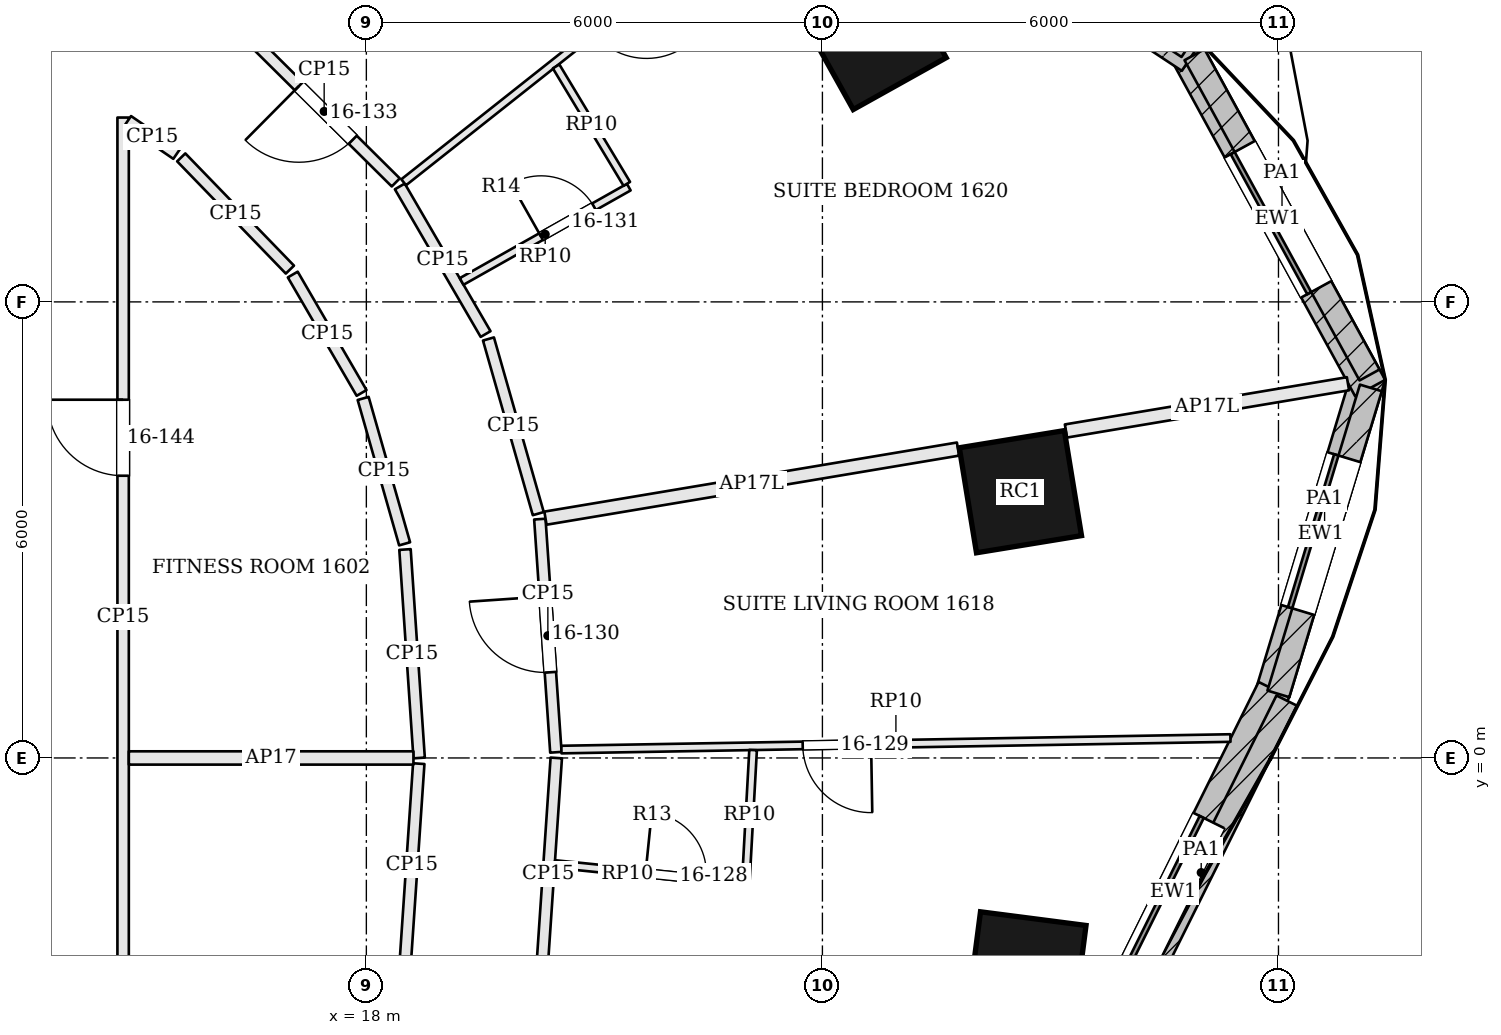
"""IFC4 building model, lengths in metres.
Left out: names, types, materials, properties, quantities, classifications, styles, units other than length and angle.
Written with IfcOpenShell. Run it as: python <this file> out.ifc"""

import sys

from ifc_helpers import new_model, si_unit, direction, frame, frame_2d, origin, origin_2d, place, context, subcontext, project, spatial, rectangle, extrude, element, fill, save


model = new_model("IFC4")
c1 = context("Model", 3, precision=1e-05, world=origin(), true_north=direction((0.0, 1.0)))
c2 = subcontext(c1, "Body", "Model", "MODEL_VIEW")
j1 = project(units=[si_unit("LENGTHUNIT", "METRE"), si_unit("PLANEANGLEUNIT", "RADIAN")], contexts=[c1])
p1 = place(None, origin())
s1 = spatial("IfcSite", under=j1, at=p1, CompositionType="ELEMENT")
p2 = place(p1, origin())
s2 = spatial("IfcBuilding", under=s1, at=p2, CompositionType="ELEMENT")
p3 = place(p2, frame((0.0, 0.0, 73.5)))
s3 = spatial("IfcBuildingStorey", under=s2, at=p3, CompositionType="ELEMENT", Elevation=73.5)
for number, where, z_axis, x_axis in (
    (1, (26.605, 3.503, 0.0), (0.0, 0.0, 1.0), (-0.161, 0.987, 0.0)),
    (2, (24.676, 9.483, 0.0), (0.0, 0.0, 1.0), (-0.487, 0.873, 0.0)),
    (3, (26.684, -2.808, 0.0), (0.0, 0.0, 1.0), (0.128, 0.992, 0.0)),
):
    element("IfcColumn", number, at=place(p3, frame(where, z_axis=z_axis, x_axis=x_axis)), inside=s3, PredefinedType="COLUMN", context=c2, shape_type="SweptSolid", body=[
        extrude(rectangle(XDim=1.4, YDim=1.4, at=origin_2d()), origin(), (0.0, 0.0, 1.0), 2.8),
    ])
p4 = place(p3, frame((29.927, 0.865, 0.0), z_axis=(0.0, 0.0, 1.0), x_axis=(0.289432445378, 0.957198443147, 0.0)))
e4 = element("IfcWall", 4, at=p4, inside=s3, PredefinedType="SOLIDWALL", context=c2, shape_type="SweptSolid", body=[
    extrude(rectangle(XDim=4.361, YDim=0.45, at=frame_2d((2.181, 0.0))), origin(), (0.0, 0.0, 1.0), 3.3),
])
p5 = place(p4, frame((1.131, 0.0, 0.9)))
e5 = element("IfcOpeningElement", 5, at=p5, cuts=e4, PredefinedType="OPENING", context=c2, shape_type="SweptSolid", body=[
    extrude(rectangle(XDim=2.1, YDim=1.8, at=frame_2d((1.05, 0.9))), frame((0.0, 0.235, 0.0), z_axis=(0.0, -1.0, 0.0), x_axis=(1.0, 0.0, 0.0)), (0.0, 0.0, 1.0), 0.47),
])
p6 = place(p3, frame((31.207, 4.866, 0.0), z_axis=(0.0, 0.0, 1.0), x_axis=(-0.479565142605, 0.877506281458, 0.0)))
e6 = element("IfcWall", 6, at=p6, inside=s3, PredefinedType="SOLIDWALL", context=c2, shape_type="SweptSolid", body=[
    extrude(rectangle(XDim=5.061, YDim=0.45, at=frame_2d((2.53, 0.0))), origin(), (0.0, 0.0, 1.0), 3.3),
])
p7 = place(p6, frame((1.48, 0.0, 0.9)))
e7 = element("IfcOpeningElement", 7, at=p7, cuts=e6, PredefinedType="OPENING", context=c2, shape_type="SweptSolid", body=[
    extrude(rectangle(XDim=2.1, YDim=1.8, at=frame_2d((1.05, 0.9))), frame((0.0, 0.235, 0.0), z_axis=(0.0, -1.0, 0.0), x_axis=(1.0, 0.0, 0.0)), (0.0, 0.0, 1.0), 0.47),
])
p8 = place(p3, frame((28.853, 9.227, 0.0), z_axis=(0.0, 0.0, 1.0), x_axis=(-0.834404370393, 0.551152743502, 0.0)))
e8 = element("IfcWall", 8, at=p8, inside=s3, PredefinedType="SOLIDWALL", context=c2, shape_type="SweptSolid", body=[
    extrude(rectangle(XDim=6.33, YDim=0.45, at=frame_2d((3.165, 0.0))), origin(), (0.0, 0.0, 1.0), 3.3),
])
p9 = place(p8, frame((2.115, 0.0, 0.9)))
e9 = element("IfcOpeningElement", 9, at=p9, cuts=e8, PredefinedType="OPENING", context=c2, shape_type="SweptSolid", body=[
    extrude(rectangle(XDim=2.1, YDim=1.8, at=frame_2d((1.05, 0.9))), frame((0.0, 0.235, 0.0), z_axis=(0.0, -1.0, 0.0), x_axis=(1.0, 0.0, 0.0)), (0.0, 0.0, 1.0), 0.47),
])
p10 = place(p3, frame((27.294, -4.427, 0.0), z_axis=(0.0, 0.0, 1.0), x_axis=(0.444913249375, 0.895573671191, 0.0)))
e10 = element("IfcWall", 10, at=p10, inside=s3, PredefinedType="SOLIDWALL", context=c2, shape_type="SweptSolid", body=[
    extrude(rectangle(XDim=5.947, YDim=0.45, at=frame_2d((2.974, 0.0))), origin(), (0.0, 0.0, 1.0), 3.3),
])
p11 = place(p10, frame((1.924, 0.0, 0.9)))
e11 = element("IfcOpeningElement", 11, at=p11, cuts=e10, PredefinedType="OPENING", context=c2, shape_type="SweptSolid", body=[
    extrude(rectangle(XDim=2.1, YDim=1.8, at=frame_2d((1.05, 0.9))), frame((0.0, 0.235, 0.0), z_axis=(0.0, -1.0, 0.0), x_axis=(1.0, 0.0, 0.0)), (0.0, 0.0, 1.0), 0.47),
])
p12 = place(p3, frame((29.998, 0.843, 3.6), z_axis=(0.0, 0.0, 1.0), x_axis=(0.289403108737, 0.95720731331, 0.0)))
e12 = element("IfcWall", 12, at=p12, inside=s3, PredefinedType="PARAPET", context=c2, shape_type="SweptSolid", body=[
    extrude(rectangle(XDim=4.205, YDim=0.3, at=frame_2d((2.103, 0.0))), origin(), (0.0, 0.0, 1.0), 1.1),
])
p13 = place(p3, frame((31.198, 5.039, 3.6), z_axis=(0.0, 0.0, 1.0), x_axis=(-0.479564593641, 0.877506581472, 0.0)))
e13 = element("IfcWall", 13, at=p13, inside=s3, PredefinedType="PARAPET", context=c2, shape_type="SweptSolid", body=[
    extrude(rectangle(XDim=4.801, YDim=0.3, at=frame_2d((2.4, 0.0))), origin(), (0.0, 0.0, 1.0), 1.1),
])
p14 = place(p3, frame((28.807, 9.347, 3.6), z_axis=(0.0, 0.0, 1.0), x_axis=(-0.834390896723, 0.551173141097, 0.0)))
e14 = element("IfcWall", 14, at=p14, inside=s3, PredefinedType="PARAPET", context=c2, shape_type="SweptSolid", body=[
    extrude(rectangle(XDim=5.087, YDim=0.3, at=frame_2d((2.543, 0.0))), origin(), (0.0, 0.0, 1.0), 1.1),
])
p15 = place(p3, frame((27.859, -3.771, 3.6), z_axis=(0.0, 0.0, 1.0), x_axis=(0.444912677503, 0.895573955292, 0.0)))
e15 = element("IfcWall", 15, at=p15, inside=s3, PredefinedType="PARAPET", context=c2, shape_type="SweptSolid", body=[
    extrude(rectangle(XDim=5.054, YDim=0.3, at=frame_2d((2.527, 0.0))), origin(), (0.0, 0.0, 1.0), 1.1),
])
p16 = place(p3, frame((20.292, -3.053, 0.0), z_axis=(0.0, 0.0, 1.0), x_axis=(0.067646719267, 0.997709337118, 0.0)))
e16 = element("IfcWall", 16, at=p16, inside=s3, PredefinedType="PARTITIONING", context=c2, shape_type="SweptSolid", body=[
    extrude(rectangle(XDim=3.061, YDim=0.15, at=frame_2d((1.53, 0.0))), origin(), (0.0, 0.0, 1.0), 2.684),
])
p17 = place(p3, frame((20.493, 0.075, 0.0), z_axis=(0.0, 0.0, 1.0), x_axis=(-0.068600445792, 0.997644214556, 0.0)))
e17 = element("IfcWall", 17, at=p17, inside=s3, PredefinedType="PARTITIONING", context=c2, shape_type="SweptSolid", body=[
    extrude(rectangle(XDim=3.075, YDim=0.15, at=frame_2d((1.538, 0.0))), origin(), (0.0, 0.0, 1.0), 2.684),
])
p18 = place(p17, frame((1.055, 0.0, 0.0)))
e18 = element("IfcOpeningElement", 18, at=p18, cuts=e17, PredefinedType="OPENING", context=c2, shape_type="SweptSolid", body=[
    extrude(rectangle(XDim=1.0, YDim=2.1, at=frame_2d((0.5, 1.05))), frame((0.0, 0.085, 0.0), z_axis=(0.0, -1.0, 0.0), x_axis=(1.0, 0.0, 0.0)), (0.0, 0.0, 1.0), 0.17),
])
p19 = place(p3, frame((30.914, 4.923, 0.0), z_axis=(0.0, 0.0, 1.0), x_axis=(-0.986255007441, -0.165230324995, 0.0)))
e19 = element("IfcWall", 19, at=p19, inside=s3, PredefinedType="PARTITIONING", context=c2, shape_type="SweptSolid", body=[
    extrude(rectangle(XDim=3.762, YDim=0.175, at=frame_2d((1.881, 0.0))), origin(), (0.0, 0.0, 1.0), 2.28),
])
p20 = place(p3, frame((25.784, 4.064, 0.0), z_axis=(0.0, 0.0, 1.0), x_axis=(-0.986264115996, -0.165175947092, 0.0)))
e20 = element("IfcWall", 20, at=p20, inside=s3, PredefinedType="PARTITIONING", context=c2, shape_type="SweptSolid", body=[
    extrude(rectangle(XDim=5.503, YDim=0.175, at=frame_2d((2.751, 0.0))), origin(), (0.0, 0.0, 1.0), 2.28),
])
p21 = place(p3, frame((20.262, 3.214, 0.0), z_axis=(0.0, 0.0, 1.0), x_axis=(-0.274235283905, 0.961662627464, 0.0)))
e21 = element("IfcWall", 21, at=p21, inside=s3, PredefinedType="PARTITIONING", context=c2, shape_type="SweptSolid", body=[
    extrude(rectangle(XDim=2.389, YDim=0.15, at=frame_2d((1.195, 0.0))), origin(), (0.0, 0.0, 1.0), 2.684),
])
p22 = place(p3, frame((19.569, 5.577, 0.0), z_axis=(0.0, 0.0, 1.0), x_axis=(-0.502457989762, 0.864601624174, 0.0)))
e22 = element("IfcWall", 22, at=p22, inside=s3, PredefinedType="PARTITIONING", context=c2, shape_type="SweptSolid", body=[
    extrude(rectangle(XDim=2.246, YDim=0.15, at=frame_2d((1.123, 0.0))), origin(), (0.0, 0.0, 1.0), 2.684),
])
p23 = place(p3, frame((18.387, 7.572, 0.0), z_axis=(0.0, 0.0, 1.0), x_axis=(-0.710044986999, 0.704156315343, 0.0)))
e23 = element("IfcWall", 23, at=p23, inside=s3, PredefinedType="PARTITIONING", context=c2, shape_type="SweptSolid", body=[
    extrude(rectangle(XDim=2.653, YDim=0.15, at=frame_2d((1.327, 0.0))), origin(), (0.0, 0.0, 1.0), 2.684),
])
p24 = place(p23, frame((0.797, 0.0, 0.0)))
e24 = element("IfcOpeningElement", 24, at=p24, cuts=e23, PredefinedType="OPENING", context=c2, shape_type="SweptSolid", body=[
    extrude(rectangle(XDim=1.0, YDim=2.1, at=frame_2d((0.5, 1.05))), frame((0.0, 0.085, 0.0), z_axis=(0.0, -1.0, 0.0), x_axis=(1.0, 0.0, 0.0)), (0.0, 0.0, 1.0), 0.17),
])
p25 = place(p3, frame((15.564, 7.901, 0.0), z_axis=(0.0, 0.0, 1.0), x_axis=(0.695611358841, -0.718418288639, 0.0)))
e25 = element("IfcWall", 25, at=p25, inside=s3, PredefinedType="PARTITIONING", context=c2, shape_type="SweptSolid", body=[
    extrude(rectangle(XDim=2.055, YDim=0.15, at=frame_2d((1.028, 0.0))), origin(), (0.0, 0.0, 1.0), 2.684),
])
p26 = place(p3, frame((17.032, 6.36, 0.0), z_axis=(0.0, 0.0, 1.0), x_axis=(0.502488551999, -0.864583862393, 0.0)))
e26 = element("IfcWall", 26, at=p26, inside=s3, PredefinedType="PARTITIONING", context=c2, shape_type="SweptSolid", body=[
    extrude(rectangle(XDim=1.802, YDim=0.15, at=frame_2d((0.901, 0.0))), origin(), (0.0, 0.0, 1.0), 2.684),
])
p27 = place(p3, frame((17.958, 4.73, 0.0), z_axis=(0.0, 0.0, 1.0), x_axis=(0.274315841816, -0.961639651288, 0.0)))
e27 = element("IfcWall", 27, at=p27, inside=s3, PredefinedType="PARTITIONING", context=c2, shape_type="SweptSolid", body=[
    extrude(rectangle(XDim=1.989, YDim=0.15, at=frame_2d((0.995, 0.0))), origin(), (0.0, 0.0, 1.0), 2.684),
])
p28 = place(p3, frame((18.508, 2.742, 0.0), z_axis=(0.0, 0.0, 1.0), x_axis=(0.067774714774, -0.997700650515, 0.0)))
e28 = element("IfcWall", 28, at=p28, inside=s3, PredefinedType="PARTITIONING", context=c2, shape_type="SweptSolid", body=[
    extrude(rectangle(XDim=2.749, YDim=0.15, at=frame_2d((1.374, 0.0))), origin(), (0.0, 0.0, 1.0), 2.684),
])
p29 = place(p3, frame((18.689, -0.075, 0.0), z_axis=(0.0, 0.0, 1.0), x_axis=(-0.067687508044, -0.997706570718, 0.0)))
e29 = element("IfcWall", 29, at=p29, inside=s3, PredefinedType="PARTITIONING", context=c2, shape_type="SweptSolid", body=[
    extrude(rectangle(XDim=2.676, YDim=0.15, at=frame_2d((1.338, 0.0))), origin(), (0.0, 0.0, 1.0), 2.684),
])
p30 = place(p3, frame((14.8, -4.725, 0.0), z_axis=(0.0, 0.0, 1.0), x_axis=(0.0, 1.0, 0.0)))
e30 = element("IfcWall", 30, at=p30, inside=s3, PredefinedType="PARTITIONING", context=c2, shape_type="SweptSolid", body=[
    extrude(rectangle(XDim=13.15, YDim=0.15, at=frame_2d((6.575, 0.0))), origin(), (0.0, 0.0, 1.0), 2.684),
])
p31 = place(p30, frame((8.438, 0.0, 0.0)))
e31 = element("IfcOpeningElement", 31, at=p31, cuts=e30, PredefinedType="OPENING", context=c2, shape_type="SweptSolid", body=[
    extrude(rectangle(XDim=1.0, YDim=2.1, at=frame_2d((0.5, 1.05))), frame((0.0, 0.085, 0.0), z_axis=(0.0, -1.0, 0.0), x_axis=(1.0, 0.0, 0.0)), (0.0, 0.0, 1.0), 0.17),
])
p32 = place(p3, frame((14.862, 8.383, 0.0), z_axis=(0.0, 0.0, 1.0), x_axis=(0.824875387239, -0.565314598721, 0.0)))
e32 = element("IfcWall", 32, at=p32, inside=s3, PredefinedType="PARTITIONING", context=c2, shape_type="SweptSolid", body=[
    extrude(rectangle(XDim=0.777, YDim=0.15, at=frame_2d((0.388, 0.0))), origin(), (0.0, 0.0, 1.0), 2.684),
])
p33 = place(p3, frame((29.368, 0.262, 0.0), z_axis=(0.0, 0.0, 1.0), x_axis=(-0.99985120268, -0.017250289805, 0.0)))
e33 = element("IfcWall", 33, at=p33, inside=s3, PredefinedType="PARTITIONING", context=c2, shape_type="SweptSolid", body=[
    extrude(rectangle(XDim=8.803, YDim=0.1, at=frame_2d((4.401, 0.0))), origin(), (0.0, 0.0, 1.0), 2.784),
])
p34 = place(p33, frame((4.728, 0.0, 0.0)))
e34 = element("IfcOpeningElement", 34, at=p34, cuts=e33, PredefinedType="OPENING", context=c2, shape_type="SweptSolid", body=[
    extrude(rectangle(XDim=0.9, YDim=2.4, at=frame_2d((0.45, 1.2))), frame((0.0, 0.06, 0.0), z_axis=(0.0, -1.0, 0.0), x_axis=(1.0, 0.0, 0.0)), (0.0, 0.0, 1.0), 0.12),
])
p35 = place(p3, frame((20.479, -1.395, 0.0), z_axis=(0.0, 0.0, 1.0), x_axis=(0.994803809099, -0.101810517152, 0.0)))
e35 = element("IfcWall", 35, at=p35, inside=s3, PredefinedType="PARTITIONING", context=c2, shape_type="SweptSolid", body=[
    extrude(rectangle(XDim=2.525, YDim=0.1, at=frame_2d((1.263, 0.0))), origin(), (0.0, 0.0, 1.0), 2.784),
])
p36 = place(p35, frame((1.2, 0.0, 0.0)))
e36 = element("IfcOpeningElement", 36, at=p36, cuts=e35, PredefinedType="OPENING", context=c2, shape_type="SweptSolid", body=[
    extrude(rectangle(XDim=0.8, YDim=2.1, at=frame_2d((0.4, 1.05))), frame((0.0, 0.06, 0.0), z_axis=(0.0, -1.0, 0.0), x_axis=(1.0, 0.0, 0.0)), (0.0, 0.0, 1.0), 0.12),
])
p37 = place(p3, frame((22.994, -1.602, 0.0), z_axis=(0.0, 0.0, 1.0), x_axis=(0.055145604925, 0.998478323379, 0.0)))
e37 = element("IfcWall", 37, at=p37, inside=s3, PredefinedType="PARTITIONING", context=c2, shape_type="SweptSolid", body=[
    extrude(rectangle(XDim=1.709, YDim=0.1, at=frame_2d((0.854, 0.0))), origin(), (0.0, 0.0, 1.0), 2.784),
])
p38 = place(p3, frame((24.157, 12.06, 0.0), z_axis=(0.0, 0.0, 1.0), x_axis=(-0.784016366574, -0.620740152515, 0.0)))
e38 = element("IfcWall", 38, at=p38, inside=s3, PredefinedType="PARTITIONING", context=c2, shape_type="SweptSolid", body=[
    extrude(rectangle(XDim=7.227, YDim=0.1, at=frame_2d((3.613, 0.0))), origin(), (0.0, 0.0, 1.0), 2.784),
])
p39 = place(p38, frame((3.152, 0.0, 0.0)))
e39 = element("IfcOpeningElement", 39, at=p39, cuts=e38, PredefinedType="OPENING", context=c2, shape_type="SweptSolid", body=[
    extrude(rectangle(XDim=0.9, YDim=2.4, at=frame_2d((0.45, 1.2))), frame((0.0, 0.06, 0.0), z_axis=(0.0, -1.0, 0.0), x_axis=(1.0, 0.0, 0.0)), (0.0, 0.0, 1.0), 0.12),
])
p40 = place(p3, frame((19.253, 6.269, 0.0), z_axis=(0.0, 0.0, 1.0), x_axis=(0.870849008749, 0.4915506118, 0.0)))
e40 = element("IfcWall", 40, at=p40, inside=s3, PredefinedType="PARTITIONING", context=c2, shape_type="SweptSolid", body=[
    extrude(rectangle(XDim=2.525, YDim=0.1, at=frame_2d((1.263, 0.0))), origin(), (0.0, 0.0, 1.0), 2.784),
])
p41 = place(p40, frame((1.2, 0.0, 0.0)))
e41 = element("IfcOpeningElement", 41, at=p41, cuts=e40, PredefinedType="OPENING", context=c2, shape_type="SweptSolid", body=[
    extrude(rectangle(XDim=0.8, YDim=2.1, at=frame_2d((0.4, 1.05))), frame((0.0, 0.06, 0.0), z_axis=(0.0, -1.0, 0.0), x_axis=(1.0, 0.0, 0.0)), (0.0, 0.0, 1.0), 0.12),
])
p42 = place(p3, frame((21.427, 7.553, 0.0), z_axis=(0.0, 0.0, 1.0), x_axis=(-0.515590167939, 0.856835327659, 0.0)))
e42 = element("IfcWall", 42, at=p42, inside=s3, PredefinedType="PARTITIONING", context=c2, shape_type="SweptSolid", body=[
    extrude(rectangle(XDim=1.804, YDim=0.1, at=frame_2d((0.902, 0.0))), origin(), (0.0, 0.0, 1.0), 2.784),
])
p43 = place(p3, frame((14.875, 0.0, 0.0), z_axis=(0.0, 0.0, 1.0), x_axis=(1.0, 0.0, 0.0)))
e43 = element("IfcWall", 43, at=p43, inside=s3, PredefinedType="PARTITIONING", context=c2, shape_type="SweptSolid", body=[
    extrude(rectangle(XDim=3.744, YDim=0.175, at=frame_2d((1.872, 0.0))), origin(), (0.0, 0.0, 1.0), 2.798),
])
p44 = place(p5, origin())
e44 = element("IfcWindow", 44, at=p44, inside=s3, PartitioningType="SINGLE_PANEL", PredefinedType="WINDOW", context=c2, shape_type="SweptSolid", body=[
    extrude(rectangle(XDim=2.1, YDim=1.8, at=frame_2d((1.05, 0.9))), frame((0.0, 0.135, 0.0), z_axis=(0.0, -1.0, 0.0), x_axis=(1.0, 0.0, 0.0)), (0.0, 0.0, 1.0), 0.06),
])
fill(e5, e44)
p45 = place(p7, origin())
e45 = element("IfcWindow", 45, at=p45, inside=s3, PartitioningType="SINGLE_PANEL", PredefinedType="WINDOW", context=c2, shape_type="SweptSolid", body=[
    extrude(rectangle(XDim=2.1, YDim=1.8, at=frame_2d((1.05, 0.9))), frame((0.0, 0.135, 0.0), z_axis=(0.0, -1.0, 0.0), x_axis=(1.0, 0.0, 0.0)), (0.0, 0.0, 1.0), 0.06),
])
fill(e7, e45)
p46 = place(p11, origin())
e46 = element("IfcWindow", 46, at=p46, inside=s3, PartitioningType="SINGLE_PANEL", PredefinedType="WINDOW", context=c2, shape_type="SweptSolid", body=[
    extrude(rectangle(XDim=2.1, YDim=1.8, at=frame_2d((1.05, 0.9))), frame((0.0, 0.135, 0.0), z_axis=(0.0, -1.0, 0.0), x_axis=(1.0, 0.0, 0.0)), (0.0, 0.0, 1.0), 0.06),
])
fill(e11, e46)
p47 = place(p36, origin())
e47 = element("IfcDoor", 47, at=p47, inside=s3, OperationType="SINGLE_SWING_LEFT", PredefinedType="DOOR", context=c2, shape_type="SweptSolid", body=[
    extrude(rectangle(XDim=0.8, YDim=2.1, at=frame_2d((0.4, 1.05))), frame((0.0, 0.025, 0.0), z_axis=(0.0, -1.0, 0.0), x_axis=(1.0, 0.0, 0.0)), (0.0, 0.0, 1.0), 0.05),
])
fill(e36, e47)
p48 = place(p34, origin())
e48 = element("IfcDoor", 48, at=p48, inside=s3, OperationType="SINGLE_SWING_LEFT", PredefinedType="DOOR", context=c2, shape_type="SweptSolid", body=[
    extrude(rectangle(XDim=0.9, YDim=2.4, at=frame_2d((0.45, 1.2))), frame((0.0, 0.025, 0.0), z_axis=(0.0, -1.0, 0.0), x_axis=(1.0, 0.0, 0.0)), (0.0, 0.0, 1.0), 0.05),
])
fill(e34, e48)
p49 = place(p18, origin())
e49 = element("IfcDoor", 49, at=p49, inside=s3, OperationType="SINGLE_SWING_RIGHT", PredefinedType="DOOR", context=c2, shape_type="SweptSolid", body=[
    extrude(rectangle(XDim=1.0, YDim=2.1, at=frame_2d((0.5, 1.05))), frame((0.0, 0.025, 0.0), z_axis=(0.0, -1.0, 0.0), x_axis=(1.0, 0.0, 0.0)), (0.0, 0.0, 1.0), 0.05),
])
fill(e18, e49)
p50 = place(p41, origin())
e50 = element("IfcDoor", 50, at=p50, inside=s3, OperationType="SINGLE_SWING_LEFT", PredefinedType="DOOR", context=c2, shape_type="SweptSolid", body=[
    extrude(rectangle(XDim=0.8, YDim=2.1, at=frame_2d((0.4, 1.05))), frame((0.0, 0.025, 0.0), z_axis=(0.0, -1.0, 0.0), x_axis=(1.0, 0.0, 0.0)), (0.0, 0.0, 1.0), 0.05),
])
fill(e41, e50)
p51 = place(p24, origin())
e51 = element("IfcDoor", 51, at=p51, inside=s3, OperationType="SINGLE_SWING_RIGHT", PredefinedType="DOOR", context=c2, shape_type="SweptSolid", body=[
    extrude(rectangle(XDim=1.0, YDim=2.1, at=frame_2d((0.5, 1.05))), frame((0.0, 0.025, 0.0), z_axis=(0.0, -1.0, 0.0), x_axis=(1.0, 0.0, 0.0)), (0.0, 0.0, 1.0), 0.05),
])
fill(e24, e51)
p52 = place(p31, origin())
e52 = element("IfcDoor", 52, at=p52, inside=s3, OperationType="SINGLE_SWING_RIGHT", PredefinedType="DOOR", context=c2, shape_type="SweptSolid", body=[
    extrude(rectangle(XDim=1.0, YDim=2.1, at=frame_2d((0.5, 1.05))), frame((0.0, 0.025, 0.0), z_axis=(0.0, -1.0, 0.0), x_axis=(1.0, 0.0, 0.0)), (0.0, 0.0, 1.0), 0.05),
])
fill(e31, e52)
save(model, sys.argv[1])
